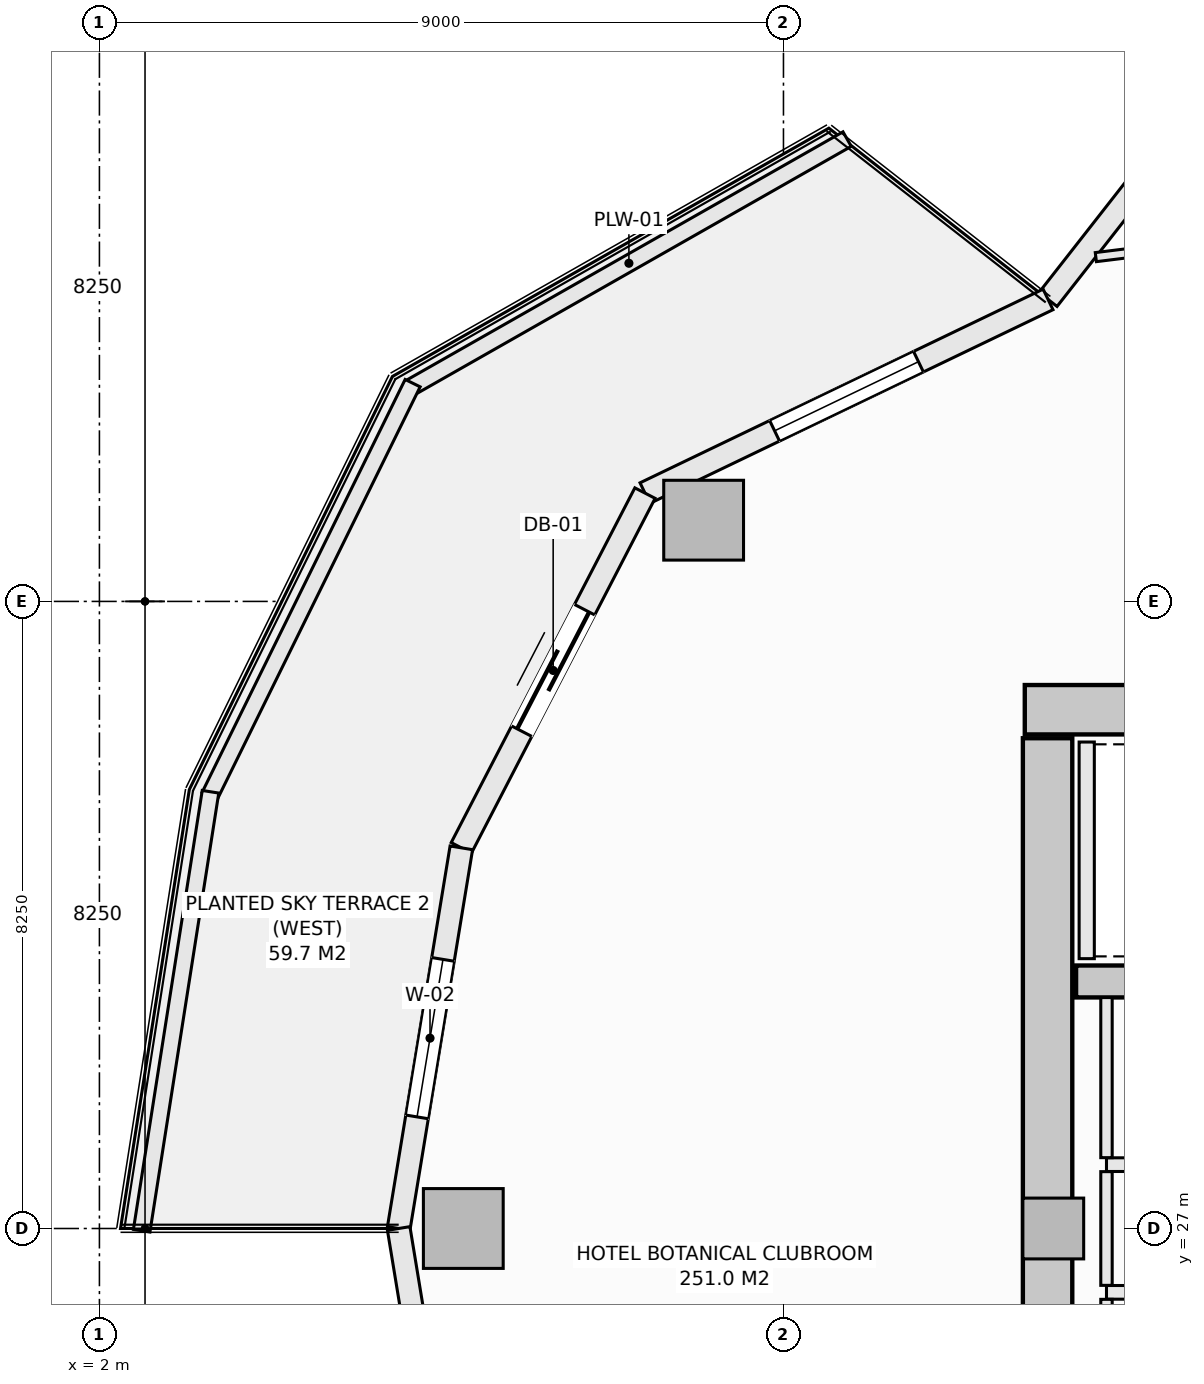
"""IFC4 building model, lengths in metres.
Left out: names, types, materials, properties, quantities, classifications, styles, units other than length and angle.
Written with IfcOpenShell. Run it as: python <this file> out.ifc"""

import sys

from ifc_helpers import new_model, si_unit, direction, frame, frame_2d, origin, origin_2d, place, context, subcontext, project, spatial, rectangle, extrude, element, fill, save


model = new_model("IFC4")
c1 = context("Model", 3, precision=1e-05, world=origin(), true_north=direction((0.0, 1.0)))
c2 = subcontext(c1, "Body", "Model", "MODEL_VIEW")
j1 = project(units=[si_unit("LENGTHUNIT", "METRE"), si_unit("PLANEANGLEUNIT", "RADIAN")], contexts=[c1])
p1 = place(None, origin())
s1 = spatial("IfcSite", under=j1, at=p1, CompositionType="ELEMENT")
p2 = place(p1, origin())
s2 = spatial("IfcBuilding", under=s1, at=p2, CompositionType="ELEMENT")
p3 = place(p2, frame((0.0, 0.0, 139.3)))
s3 = spatial("IfcBuildingStorey", under=s2, at=p3, CompositionType="ELEMENT", Elevation=139.3)
p4 = place(p3, frame((14.175, 33.825, -0.27), z_axis=(0.0, 0.0, 1.0), x_axis=(1.0, 0.0, 0.0)))
e1 = element("IfcWall", 1, at=p4, inside=s3, PredefinedType="SHEAR", context=c2, shape_type="SweptSolid", body=[
    extrude(rectangle(XDim=13.65, YDim=0.65, at=frame_2d((6.825, 0.0))), origin(), (0.0, 0.0, 1.0), 3.4),
])
p5 = place(p3, frame((14.475, 20.55, -0.27), z_axis=(0.0, 0.0, 1.0), x_axis=(0.0, 1.0, 0.0)))
e2 = element("IfcWall", 2, at=p5, inside=s3, PredefinedType="SHEAR", context=c2, shape_type="SweptSolid", body=[
    extrude(rectangle(XDim=12.9, YDim=0.65, at=frame_2d((6.45, 0.0))), origin(), (0.0, 0.0, 1.0), 3.4),
])
p6 = place(p3, frame((14.85, 30.25, -0.27), z_axis=(0.0, 0.0, 1.0), x_axis=(1.0, 0.0, 0.0)))
e3 = element("IfcWall", 3, at=p6, inside=s3, PredefinedType="SHEAR", context=c2, shape_type="SweptSolid", body=[
    extrude(rectangle(XDim=7.3, YDim=0.42, at=frame_2d((3.65, 0.0))), origin(), (0.0, 0.0, 1.0), 3.4),
])
for number, where, z_axis, x_axis in (
    (4, (9.95, 36.319, -0.27), (0.0, 0.0, 1.0), (1.0, 0.0, 0.0)),
    (5, (6.788, 27.0, -0.27), (0.0, 0.0, 1.0), (1.0, 0.0, 0.0)),
):
    element("IfcColumn", number, at=place(p3, frame(where, z_axis=z_axis, x_axis=x_axis)), inside=s3, PredefinedType="COLUMN", context=c2, shape_type="SweptSolid", body=[
        extrude(rectangle(XDim=1.05, YDim=1.05, at=origin_2d()), origin(), (0.0, 0.0, 1.0), 3.4),
    ])
p7 = place(p3, frame((14.55, 27.0, -0.27), z_axis=(0.0, 0.0, 1.0), x_axis=(1.0, 0.0, 0.0)))
e6 = element("IfcColumn", 6, at=p7, inside=s3, PredefinedType="PILASTER", context=c2, shape_type="SweptSolid", body=[
    extrude(rectangle(XDim=0.8, YDim=0.8, at=origin_2d()), origin(), (0.0, 0.0, 1.0), 3.4),
])
p8 = place(p3, frame((14.481, 39.223, 0.0), z_axis=(0.0, 0.0, 1.0), x_axis=(0.616435134162, 0.787405693001, 0.0)))
e7 = element("IfcWall", 7, at=p8, inside=s3, PredefinedType="SOLIDWALL", context=c2, shape_type="SweptSolid", body=[
    extrude(rectangle(XDim=5.759, YDim=0.3, at=frame_2d((2.879, 0.0))), origin(), (0.0, 0.0, 1.0), 2.653),
])
p9 = place(p8, frame((1.92, 0.0, 0.74)))
e8 = element("IfcOpeningElement", 8, at=p9, cuts=e7, PredefinedType="OPENING", context=c2, shape_type="SweptSolid", body=[
    extrude(rectangle(XDim=2.1, YDim=1.7, at=frame_2d((1.05, 0.85))), frame((0.0, 0.16, 0.0), z_axis=(0.0, -1.0, 0.0), x_axis=(1.0, 0.0, 0.0)), (0.0, 0.0, 1.0), 0.32),
])
p10 = place(p3, frame((9.178, 36.675, 0.0), z_axis=(0.0, 0.0, 1.0), x_axis=(0.901370184739, 0.433049408339, 0.0)))
e9 = element("IfcWall", 9, at=p10, inside=s3, PredefinedType="SOLIDWALL", context=c2, shape_type="SweptSolid", body=[
    extrude(rectangle(XDim=5.884, YDim=0.3, at=frame_2d((2.942, 0.0))), origin(), (0.0, 0.0, 1.0), 2.653),
])
p11 = place(p10, frame((1.892, 0.0, 0.74)))
e10 = element("IfcOpeningElement", 10, at=p11, cuts=e9, PredefinedType="OPENING", context=c2, shape_type="SweptSolid", body=[
    extrude(rectangle(XDim=2.1, YDim=1.7, at=frame_2d((1.05, 0.85))), frame((0.0, 0.16, 0.0), z_axis=(0.0, -1.0, 0.0), x_axis=(1.0, 0.0, 0.0)), (0.0, 0.0, 1.0), 0.32),
])
p12 = place(p3, frame((6.762, 32.008, 0.0), z_axis=(0.0, 0.0, 1.0), x_axis=(0.459767899643, 0.888039119892, 0.0)))
e11 = element("IfcWall", 11, at=p12, inside=s3, PredefinedType="SOLIDWALL", context=c2, shape_type="SweptSolid", body=[
    extrude(rectangle(XDim=5.255, YDim=0.3, at=frame_2d((2.628, 0.0))), origin(), (0.0, 0.0, 1.0), 2.653),
])
p13 = place(p12, frame((1.728, 0.0, 0.0)))
e12 = element("IfcOpeningElement", 12, at=p13, cuts=e11, PredefinedType="OPENING", context=c2, shape_type="SweptSolid", body=[
    extrude(rectangle(XDim=1.8, YDim=2.25, at=frame_2d((0.9, 1.125))), frame((0.0, 0.16, 0.0), z_axis=(0.0, -1.0, 0.0), x_axis=(1.0, 0.0, 0.0)), (0.0, 0.0, 1.0), 0.32),
])
p14 = place(p3, frame((5.938, 27.0, 0.0), z_axis=(0.0, 0.0, 1.0), x_axis=(0.162393944769, 0.986726003864, 0.0)))
e13 = element("IfcWall", 13, at=p14, inside=s3, PredefinedType="SOLIDWALL", context=c2, shape_type="SweptSolid", body=[
    extrude(rectangle(XDim=5.075, YDim=0.3, at=frame_2d((2.538, 0.0))), origin(), (0.0, 0.0, 1.0), 2.653),
])
p15 = place(p14, frame((1.488, 0.0, 0.74)))
e14 = element("IfcOpeningElement", 14, at=p15, cuts=e13, PredefinedType="OPENING", context=c2, shape_type="SweptSolid", body=[
    extrude(rectangle(XDim=2.1, YDim=1.7, at=frame_2d((1.05, 0.85))), frame((0.0, 0.16, 0.0), z_axis=(0.0, -1.0, 0.0), x_axis=(1.0, 0.0, 0.0)), (0.0, 0.0, 1.0), 0.32),
])
p16 = place(p3, frame((5.938, 27.0, 0.0), z_axis=(0.0, 0.0, 1.0), x_axis=(0.162393944769, -0.986726003864, 0.0)))
e15 = element("IfcWall", 15, at=p16, inside=s3, PredefinedType="SOLIDWALL", context=c2, shape_type="SweptSolid", body=[
    extrude(rectangle(XDim=5.075, YDim=0.3, at=frame_2d((2.538, 0.0))), origin(), (0.0, 0.0, 1.0), 2.653),
])
p17 = place(p16, frame((1.488, 0.0, 0.74)))
e16 = element("IfcOpeningElement", 16, at=p17, cuts=e15, PredefinedType="OPENING", context=c2, shape_type="SweptSolid", body=[
    extrude(rectangle(XDim=2.1, YDim=1.7, at=frame_2d((1.05, 0.85))), frame((0.0, 0.16, 0.0), z_axis=(0.0, -1.0, 0.0), x_axis=(1.0, 0.0, 0.0)), (0.0, 0.0, 1.0), 0.32),
])
p18 = place(p3, frame((6.095, 38.066, 0.0), z_axis=(0.0, 0.0, 1.0), x_axis=(0.869187658335, 0.494482370361, 0.0)))
e17 = element("IfcWall", 17, at=p18, inside=s3, PredefinedType="PARAPET", context=c2, shape_type="SweptSolid", body=[
    extrude(rectangle(XDim=6.606, YDim=0.22, at=frame_2d((3.303, 0.0))), origin(), (0.0, 0.0, 1.0), 0.52),
])
p19 = place(p3, frame((3.449, 32.687, 0.0), z_axis=(0.0, 0.0, 1.0), x_axis=(0.441269631716, 0.897374566235, 0.0)))
e18 = element("IfcWall", 18, at=p19, inside=s3, PredefinedType="PARAPET", context=c2, shape_type="SweptSolid", body=[
    extrude(rectangle(XDim=6.056, YDim=0.22, at=frame_2d((3.028, 0.0))), origin(), (0.0, 0.0, 1.0), 0.52),
])
p20 = place(p3, frame((2.556, 26.971, 0.0), z_axis=(0.0, 0.0, 1.0), x_axis=(0.154903030247, 0.987929679289, 0.0)))
e19 = element("IfcWall", 19, at=p20, inside=s3, PredefinedType="PARAPET", context=c2, shape_type="SweptSolid", body=[
    extrude(rectangle(XDim=5.846, YDim=0.22, at=frame_2d((2.923, 0.0))), origin(), (0.0, 0.0, 1.0), 0.52),
])
p21 = place(p3, frame((14.99, 30.55, 0.0), z_axis=(0.0, 0.0, 1.0), x_axis=(0.0, 1.0, 0.0)))
e20 = element("IfcWall", 20, at=p21, inside=s3, PredefinedType="SOLIDWALL", context=c2, shape_type="SweptSolid", body=[
    extrude(rectangle(XDim=2.85, YDim=0.2, at=frame_2d((1.425, 0.0))), origin(), (0.0, 0.0, 1.0), 3.13),
])
p22 = place(p3, frame((15.25, 27.84, 0.0), z_axis=(0.0, 0.0, 1.0), x_axis=(1.0, 0.0, 0.0)))
e21 = element("IfcWall", 21, at=p22, inside=s3, PredefinedType="SOLIDWALL", context=c2, shape_type="SweptSolid", body=[
    extrude(rectangle(XDim=6.9, YDim=0.18, at=frame_2d((3.45, 0.0))), origin(), (0.0, 0.0, 1.0), 3.13),
])
p23 = place(p22, frame((5.02, 0.0, 0.0)))
e22 = element("IfcOpeningElement", 22, at=p23, cuts=e21, PredefinedType="OPENING", context=c2, shape_type="SweptSolid", body=[
    extrude(rectangle(XDim=0.95, YDim=2.1, at=frame_2d((0.475, 1.05))), frame((0.0, 0.1, 0.0), z_axis=(0.0, -1.0, 0.0), x_axis=(1.0, 0.0, 0.0)), (0.0, 0.0, 1.0), 0.2),
])
p24 = place(p22, frame((0.855, 0.0, 0.0)))
e23 = element("IfcOpeningElement", 23, at=p24, cuts=e21, PredefinedType="OPENING", context=c2, shape_type="SweptSolid", body=[
    extrude(rectangle(XDim=0.95, YDim=2.1, at=frame_2d((0.475, 1.05))), frame((0.0, 0.1, 0.0), z_axis=(0.0, -1.0, 0.0), x_axis=(1.0, 0.0, 0.0)), (0.0, 0.0, 1.0), 0.2),
])
p25 = place(p22, frame((2.9, 0.0, 0.0)))
e24 = element("IfcOpeningElement", 24, at=p25, cuts=e21, PredefinedType="OPENING", context=c2, shape_type="SweptSolid", body=[
    extrude(rectangle(XDim=0.95, YDim=2.1, at=frame_2d((0.475, 1.05))), frame((0.0, 0.1, 0.0), z_axis=(0.0, -1.0, 0.0), x_axis=(1.0, 0.0, 0.0)), (0.0, 0.0, 1.0), 0.2),
])
p26 = place(p3, frame((15.25, 26.16, 0.0), z_axis=(0.0, 0.0, 1.0), x_axis=(1.0, 0.0, 0.0)))
e25 = element("IfcWall", 25, at=p26, inside=s3, PredefinedType="SOLIDWALL", context=c2, shape_type="SweptSolid", body=[
    extrude(rectangle(XDim=6.9, YDim=0.18, at=frame_2d((3.45, 0.0))), origin(), (0.0, 0.0, 1.0), 3.13),
])
p27 = place(p26, frame((5.02, 0.0, 0.0)))
e26 = element("IfcOpeningElement", 26, at=p27, cuts=e25, PredefinedType="OPENING", context=c2, shape_type="SweptSolid", body=[
    extrude(rectangle(XDim=0.95, YDim=2.1, at=frame_2d((0.475, 1.05))), frame((0.0, 0.1, 0.0), z_axis=(0.0, -1.0, 0.0), x_axis=(1.0, 0.0, 0.0)), (0.0, 0.0, 1.0), 0.2),
])
p28 = place(p26, frame((0.855, 0.0, 0.0)))
e27 = element("IfcOpeningElement", 27, at=p28, cuts=e25, PredefinedType="OPENING", context=c2, shape_type="SweptSolid", body=[
    extrude(rectangle(XDim=0.95, YDim=2.1, at=frame_2d((0.475, 1.05))), frame((0.0, 0.1, 0.0), z_axis=(0.0, -1.0, 0.0), x_axis=(1.0, 0.0, 0.0)), (0.0, 0.0, 1.0), 0.2),
])
p29 = place(p26, frame((2.9, 0.0, 0.0)))
e28 = element("IfcOpeningElement", 28, at=p29, cuts=e25, PredefinedType="OPENING", context=c2, shape_type="SweptSolid", body=[
    extrude(rectangle(XDim=0.95, YDim=2.1, at=frame_2d((0.475, 1.05))), frame((0.0, 0.1, 0.0), z_axis=(0.0, -1.0, 0.0), x_axis=(1.0, 0.0, 0.0)), (0.0, 0.0, 1.0), 0.2),
])
p30 = place(p3, frame((15.25, 23.962, 0.0), z_axis=(0.0, 0.0, 1.0), x_axis=(0.0, 1.0, 0.0)))
e29 = element("IfcWall", 29, at=p30, inside=s3, PredefinedType="PARTITIONING", context=c2, shape_type="SweptSolid", body=[
    extrude(rectangle(XDim=2.106, YDim=0.15, at=frame_2d((1.053, 0.0))), origin(), (0.0, 0.0, 1.0), 3.13),
])
p31 = place(p3, frame((15.25, 26.252, 0.0), z_axis=(0.0, 0.0, 1.0), x_axis=(0.0, 1.0, 0.0)))
e30 = element("IfcWall", 30, at=p31, inside=s3, PredefinedType="PARTITIONING", context=c2, shape_type="SweptSolid", body=[
    extrude(rectangle(XDim=1.496, YDim=0.15, at=frame_2d((0.748, 0.0))), origin(), (0.0, 0.0, 1.0), 3.13),
])
p32 = place(p3, frame((15.25, 27.932, 0.0), z_axis=(0.0, 0.0, 1.0), x_axis=(0.0, 1.0, 0.0)))
e31 = element("IfcWall", 31, at=p32, inside=s3, PredefinedType="PARTITIONING", context=c2, shape_type="SweptSolid", body=[
    extrude(rectangle(XDim=2.106, YDim=0.15, at=frame_2d((1.053, 0.0))), origin(), (0.0, 0.0, 1.0), 3.13),
])
p33 = place(p3, frame((15.11, 39.78, 0.0), z_axis=(0.0, 0.0, 1.0), x_axis=(0.992465524728, 0.122524210773, 0.0)))
e32 = element("IfcWall", 32, at=p33, inside=s3, PredefinedType="PARTITIONING", context=c2, shape_type="SweptSolid", body=[
    extrude(rectangle(XDim=6.287, YDim=0.12, at=frame_2d((3.143, 0.0))), origin(), (0.0, 0.0, 1.0), 3.13),
])
p34 = place(p11, origin())
e33 = element("IfcWindow", 33, at=p34, inside=s3, PartitioningType="SINGLE_PANEL", PredefinedType="WINDOW", context=c2, shape_type="SweptSolid", body=[
    extrude(rectangle(XDim=2.1, YDim=1.7, at=frame_2d((1.05, 0.85))), frame((0.0, 0.03, 0.0), z_axis=(0.0, -1.0, 0.0), x_axis=(1.0, 0.0, 0.0)), (0.0, 0.0, 1.0), 0.06),
])
fill(e10, e33)
p35 = place(p13, origin())
e34 = element("IfcDoor", 34, at=p35, inside=s3, OperationType="SLIDING_TO_LEFT", PredefinedType="DOOR", context=c2, shape_type="SweptSolid", body=[
    extrude(rectangle(XDim=1.8, YDim=2.25, at=frame_2d((0.9, 1.125))), frame((0.0, 0.025, 0.0), z_axis=(0.0, -1.0, 0.0), x_axis=(1.0, 0.0, 0.0)), (0.0, 0.0, 1.0), 0.05),
])
fill(e12, e34)
p36 = place(p15, origin())
e35 = element("IfcWindow", 35, at=p36, inside=s3, PartitioningType="SINGLE_PANEL", PredefinedType="WINDOW", context=c2, shape_type="SweptSolid", body=[
    extrude(rectangle(XDim=2.1, YDim=1.7, at=frame_2d((1.05, 0.85))), frame((0.0, 0.03, 0.0), z_axis=(0.0, -1.0, 0.0), x_axis=(1.0, 0.0, 0.0)), (0.0, 0.0, 1.0), 0.06),
])
fill(e14, e35)
save(model, sys.argv[1])
